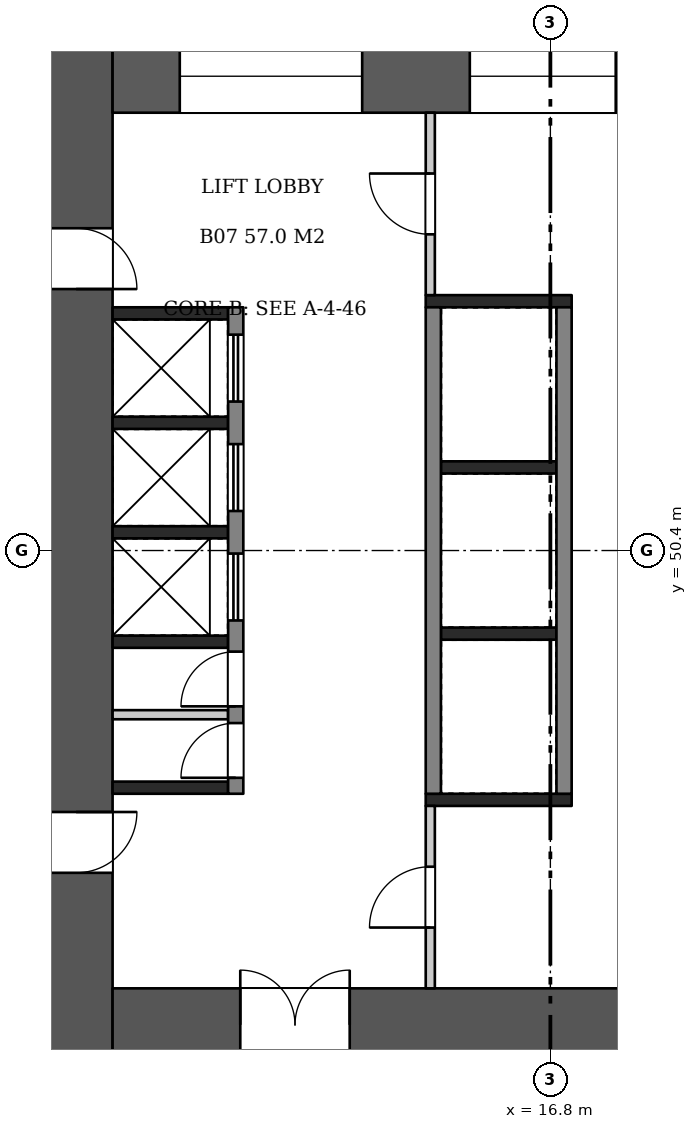
"""IFC4 building model, lengths in metres.
Left out: names, types, materials, properties, quantities, classifications, styles, units other than length and angle.
Written with IfcOpenShell. Run it as: python <this file> out.ifc"""

import sys

from ifc_helpers import new_model, si_unit, direction, frame, frame_2d, origin, place, context, subcontext, project, spatial, rectangle, extrude, element, fill, save


model = new_model("IFC4")
c1 = context("Model", 3, precision=1e-05, world=origin(), true_north=direction((0.0, 1.0)))
c2 = subcontext(c1, "Body", "Model", "MODEL_VIEW")
j1 = project(units=[si_unit("LENGTHUNIT", "METRE"), si_unit("PLANEANGLEUNIT", "RADIAN")], contexts=[c1])
p1 = place(None, origin())
s1 = spatial("IfcSite", under=j1, at=p1, CompositionType="ELEMENT")
p2 = place(p1, origin())
s2 = spatial("IfcBuilding", under=s1, at=p2, CompositionType="ELEMENT")
p3 = place(p2, frame((0.0, 0.0, 35.7)))
s3 = spatial("IfcBuildingStorey", under=s2, at=p3, CompositionType="ELEMENT", Elevation=35.7)
p4 = place(p3, frame((9.0, 58.8, 0.0), z_axis=(0.0, 0.0, 1.0), x_axis=(0.0, -1.0, 0.0)))
e1 = element("IfcWall", 1, at=p4, inside=s3, PredefinedType="SHEAR", context=c2, shape_type="SweptSolid", body=[
    extrude(rectangle(XDim=16.8, YDim=1.2, at=frame_2d((8.4, 0.0))), origin(), (0.0, 0.0, 1.0), 3.22),
])
p5 = place(p4, frame((3.1, 0.0, 0.0)))
e2 = element("IfcOpeningElement", 2, at=p5, cuts=e1, PredefinedType="OPENING", context=c2, shape_type="SweptSolid", body=[
    extrude(rectangle(XDim=1.0, YDim=2.1, at=frame_2d((0.5, 1.05))), frame((0.0, 0.61, 0.0), z_axis=(0.0, -1.0, 0.0), x_axis=(1.0, 0.0, 0.0)), (0.0, 0.0, 1.0), 1.22),
])
p6 = place(p4, frame((12.7, 0.0, 0.0)))
e3 = element("IfcOpeningElement", 3, at=p6, cuts=e1, PredefinedType="OPENING", context=c2, shape_type="SweptSolid", body=[
    extrude(rectangle(XDim=1.0, YDim=2.1, at=frame_2d((0.5, 1.05))), frame((0.0, 0.61, 0.0), z_axis=(0.0, -1.0, 0.0), x_axis=(1.0, 0.0, 0.0)), (0.0, 0.0, 1.0), 1.22),
])
p7 = place(p3, frame((9.6, 58.2, 0.0), z_axis=(0.0, 0.0, 1.0), x_axis=(1.0, 0.0, 0.0)))
e4 = element("IfcWall", 4, at=p7, inside=s3, PredefinedType="SHEAR", context=c2, shape_type="SweptSolid", body=[
    extrude(rectangle(XDim=14.4, YDim=1.2, at=frame_2d((7.2, 0.0))), origin(), (0.0, 0.0, 1.0), 3.22),
])
p8 = place(p7, frame((1.105, 0.0, 0.6)))
e5 = element("IfcOpeningElement", 5, at=p8, cuts=e4, PredefinedType="OPENING", context=c2, shape_type="SweptSolid", body=[
    extrude(rectangle(XDim=3.0, YDim=2.1, at=frame_2d((1.5, 1.05))), frame((0.0, 0.61, 0.0), z_axis=(0.0, -1.0, 0.0), x_axis=(1.0, 0.0, 0.0)), (0.0, 0.0, 1.0), 1.22),
])
p9 = place(p7, frame((5.875, 0.0, 0.6)))
e6 = element("IfcOpeningElement", 6, at=p9, cuts=e4, PredefinedType="OPENING", context=c2, shape_type="SweptSolid", body=[
    extrude(rectangle(XDim=2.4, YDim=2.1, at=frame_2d((1.2, 1.05))), frame((0.0, 0.61, 0.0), z_axis=(0.0, -1.0, 0.0), x_axis=(1.0, 0.0, 0.0)), (0.0, 0.0, 1.0), 1.22),
])
p10 = place(p7, frame((9.993, 0.0, 0.5)))
e7 = element("IfcOpeningElement", 7, at=p10, cuts=e4, PredefinedType="OPENING", context=c2, shape_type="SweptSolid", body=[
    extrude(rectangle(XDim=1.2, YDim=2.4, at=frame_2d((0.6, 1.2))), frame((0.0, 0.61, 0.0), z_axis=(0.0, -1.0, 0.0), x_axis=(1.0, 0.0, 0.0)), (0.0, 0.0, 1.0), 1.22),
])
p11 = place(p7, frame((12.197, 0.0, 0.5)))
e8 = element("IfcOpeningElement", 8, at=p11, cuts=e4, PredefinedType="OPENING", context=c2, shape_type="SweptSolid", body=[
    extrude(rectangle(XDim=1.2, YDim=2.4, at=frame_2d((0.6, 1.2))), frame((0.0, 0.61, 0.0), z_axis=(0.0, -1.0, 0.0), x_axis=(1.0, 0.0, 0.0)), (0.0, 0.0, 1.0), 1.22),
])
p12 = place(p3, frame((9.6, 42.6, 0.0), z_axis=(0.0, 0.0, 1.0), x_axis=(1.0, 0.0, 0.0)))
e9 = element("IfcWall", 9, at=p12, inside=s3, PredefinedType="SHEAR", context=c2, shape_type="SweptSolid", body=[
    extrude(rectangle(XDim=14.4, YDim=1.2, at=frame_2d((7.2, 0.0))), origin(), (0.0, 0.0, 1.0), 3.22),
])
p13 = place(p12, frame((2.1, 0.0, 0.0)))
e10 = element("IfcOpeningElement", 10, at=p13, cuts=e9, PredefinedType="OPENING", context=c2, shape_type="SweptSolid", body=[
    extrude(rectangle(XDim=1.8, YDim=2.1, at=frame_2d((0.9, 1.05))), frame((0.0, 0.61, 0.0), z_axis=(0.0, -1.0, 0.0), x_axis=(1.0, 0.0, 0.0)), (0.0, 0.0, 1.0), 1.22),
])
for number, where, z_axis, x_axis in (
    (11, (9.6, 54.3, 0.0), (0.0, 0.0, 1.0), (1.0, 0.0, 0.0)),
    (12, (9.6, 52.5, 0.0), (0.0, 0.0, 1.0), (1.0, 0.0, 0.0)),
    (13, (9.6, 50.7, 0.0), (0.0, 0.0, 1.0), (1.0, 0.0, 0.0)),
    (14, (9.6, 48.9, 0.0), (0.0, 0.0, 1.0), (1.0, 0.0, 0.0)),
    (15, (9.6, 46.5, 0.0), (0.0, 0.0, 1.0), (1.0, 0.0, 0.0)),
):
    element("IfcWall", number, at=place(p3, frame(where, z_axis=z_axis, x_axis=x_axis)), inside=s3, PredefinedType="SHEAR", context=c2, shape_type="SweptSolid", body=[
        extrude(rectangle(XDim=1.9, YDim=0.2, at=frame_2d((0.95, 0.0))), origin(), (0.0, 0.0, 1.0), 3.22),
    ])
p14 = place(p3, frame((9.6, 47.7, 0.0), z_axis=(0.0, 0.0, 1.0), x_axis=(1.0, 0.0, 0.0)))
e16 = element("IfcWall", 16, at=p14, inside=s3, PredefinedType="PARTITIONING", context=c2, shape_type="SweptSolid", body=[
    extrude(rectangle(XDim=1.9, YDim=0.15, at=frame_2d((0.95, 0.0))), origin(), (0.0, 0.0, 1.0), 3.22),
])
p15 = place(p3, frame((11.625, 54.4, 0.0), z_axis=(0.0, 0.0, 1.0), x_axis=(0.0, -1.0, 0.0)))
e17 = element("IfcWall", 17, at=p15, inside=s3, PredefinedType="SHEAR", context=c2, shape_type="SweptSolid", body=[
    extrude(rectangle(XDim=8.0, YDim=0.25, at=frame_2d((4.0, 0.0))), origin(), (0.0, 0.0, 1.0), 3.22),
])
p16 = place(p15, frame((0.45, 0.0, 0.0)))
e18 = element("IfcOpeningElement", 18, at=p16, cuts=e17, PredefinedType="OPENING", context=c2, shape_type="SweptSolid", body=[
    extrude(rectangle(XDim=1.1, YDim=2.1, at=frame_2d((0.55, 1.05))), frame((0.0, 0.135, 0.0), z_axis=(0.0, -1.0, 0.0), x_axis=(1.0, 0.0, 0.0)), (0.0, 0.0, 1.0), 0.27),
])
p17 = place(p15, frame((2.25, 0.0, 0.0)))
e19 = element("IfcOpeningElement", 19, at=p17, cuts=e17, PredefinedType="OPENING", context=c2, shape_type="SweptSolid", body=[
    extrude(rectangle(XDim=1.1, YDim=2.1, at=frame_2d((0.55, 1.05))), frame((0.0, 0.135, 0.0), z_axis=(0.0, -1.0, 0.0), x_axis=(1.0, 0.0, 0.0)), (0.0, 0.0, 1.0), 0.27),
])
p18 = place(p15, frame((4.05, 0.0, 0.0)))
e20 = element("IfcOpeningElement", 20, at=p18, cuts=e17, PredefinedType="OPENING", context=c2, shape_type="SweptSolid", body=[
    extrude(rectangle(XDim=1.1, YDim=2.1, at=frame_2d((0.55, 1.05))), frame((0.0, 0.135, 0.0), z_axis=(0.0, -1.0, 0.0), x_axis=(1.0, 0.0, 0.0)), (0.0, 0.0, 1.0), 0.27),
])
p19 = place(p15, frame((5.663, 0.0, 0.0)))
e21 = element("IfcOpeningElement", 21, at=p19, cuts=e17, PredefinedType="OPENING", context=c2, shape_type="SweptSolid", body=[
    extrude(rectangle(XDim=0.9, YDim=2.1, at=frame_2d((0.45, 1.05))), frame((0.0, 0.135, 0.0), z_axis=(0.0, -1.0, 0.0), x_axis=(1.0, 0.0, 0.0)), (0.0, 0.0, 1.0), 0.27),
])
p20 = place(p15, frame((6.837, 0.0, 0.0)))
e22 = element("IfcOpeningElement", 22, at=p20, cuts=e17, PredefinedType="OPENING", context=c2, shape_type="SweptSolid", body=[
    extrude(rectangle(XDim=0.9, YDim=2.1, at=frame_2d((0.45, 1.05))), frame((0.0, 0.135, 0.0), z_axis=(0.0, -1.0, 0.0), x_axis=(1.0, 0.0, 0.0)), (0.0, 0.0, 1.0), 0.27),
])
for number, where, z_axis, x_axis in (
    (23, (15.0, 51.767, 0.0), (0.0, 0.0, 1.0), (1.0, 0.0, 0.0)),
    (24, (15.0, 49.033, 0.0), (0.0, 0.0, 1.0), (1.0, 0.0, 0.0)),
):
    element("IfcWall", number, at=place(p3, frame(where, z_axis=z_axis, x_axis=x_axis)), inside=s3, PredefinedType="SHEAR", context=c2, shape_type="SweptSolid", body=[
        extrude(rectangle(XDim=1.9, YDim=0.2, at=frame_2d((0.95, 0.0))), origin(), (0.0, 0.0, 1.0), 3.22),
    ])
for number, where, z_axis, x_axis in (
    (25, (14.875, 54.4, 0.0), (0.0, 0.0, 1.0), (0.0, -1.0, 0.0)),
    (26, (17.025, 54.4, 0.0), (0.0, 0.0, 1.0), (0.0, -1.0, 0.0)),
):
    element("IfcWall", number, at=place(p3, frame(where, z_axis=z_axis, x_axis=x_axis)), inside=s3, PredefinedType="SHEAR", context=c2, shape_type="SweptSolid", body=[
        extrude(rectangle(XDim=8.0, YDim=0.25, at=frame_2d((4.0, 0.0))), origin(), (0.0, 0.0, 1.0), 3.22),
    ])
p21 = place(p3, frame((14.75, 54.5, 0.0), z_axis=(0.0, 0.0, 1.0), x_axis=(1.0, 0.0, 0.0)))
e27 = element("IfcWall", 27, at=p21, inside=s3, PredefinedType="SHEAR", context=c2, shape_type="SweptSolid", body=[
    extrude(rectangle(XDim=2.4, YDim=0.2, at=frame_2d((1.2, 0.0))), origin(), (0.0, 0.0, 1.0), 3.22),
])
p22 = place(p3, frame((14.825, 57.6, 0.0), z_axis=(0.0, 0.0, 1.0), x_axis=(0.0, -1.0, 0.0)))
e28 = element("IfcWall", 28, at=p22, inside=s3, PredefinedType="PARTITIONING", context=c2, shape_type="SweptSolid", body=[
    extrude(rectangle(XDim=3.0, YDim=0.15, at=frame_2d((1.5, 0.0))), origin(), (0.0, 0.0, 1.0), 3.22),
])
p23 = place(p22, frame((1.0, 0.0, 0.0)))
e29 = element("IfcOpeningElement", 29, at=p23, cuts=e28, PredefinedType="OPENING", context=c2, shape_type="SweptSolid", body=[
    extrude(rectangle(XDim=1.0, YDim=2.1, at=frame_2d((0.5, 1.05))), frame((0.0, 0.085, 0.0), z_axis=(0.0, -1.0, 0.0), x_axis=(1.0, 0.0, 0.0)), (0.0, 0.0, 1.0), 0.17),
])
p24 = place(p3, frame((14.75, 46.3, 0.0), z_axis=(0.0, 0.0, 1.0), x_axis=(1.0, 0.0, 0.0)))
e30 = element("IfcWall", 30, at=p24, inside=s3, PredefinedType="SHEAR", context=c2, shape_type="SweptSolid", body=[
    extrude(rectangle(XDim=2.4, YDim=0.2, at=frame_2d((1.2, 0.0))), origin(), (0.0, 0.0, 1.0), 3.22),
])
p25 = place(p3, frame((14.825, 46.2, 0.0), z_axis=(0.0, 0.0, 1.0), x_axis=(0.0, -1.0, 0.0)))
e31 = element("IfcWall", 31, at=p25, inside=s3, PredefinedType="PARTITIONING", context=c2, shape_type="SweptSolid", body=[
    extrude(rectangle(XDim=3.0, YDim=0.15, at=frame_2d((1.5, 0.0))), origin(), (0.0, 0.0, 1.0), 3.22),
])
p26 = place(p25, frame((1.0, 0.0, 0.0)))
e32 = element("IfcOpeningElement", 32, at=p26, cuts=e31, PredefinedType="OPENING", context=c2, shape_type="SweptSolid", body=[
    extrude(rectangle(XDim=1.0, YDim=2.1, at=frame_2d((0.5, 1.05))), frame((0.0, 0.085, 0.0), z_axis=(0.0, -1.0, 0.0), x_axis=(1.0, 0.0, 0.0)), (0.0, 0.0, 1.0), 0.17),
])
p27 = place(p5, origin())
e33 = element("IfcDoor", 33, at=p27, inside=s3, OperationType="SINGLE_SWING_RIGHT", PredefinedType="DOOR", context=c2, shape_type="SweptSolid", body=[
    extrude(rectangle(XDim=1.0, YDim=2.1, at=frame_2d((0.5, 1.05))), frame((0.0, 0.025, 0.0), z_axis=(0.0, -1.0, 0.0), x_axis=(1.0, 0.0, 0.0)), (0.0, 0.0, 1.0), 0.05),
])
fill(e2, e33)
p28 = place(p6, origin())
e34 = element("IfcDoor", 34, at=p28, inside=s3, OperationType="SINGLE_SWING_LEFT", PredefinedType="DOOR", context=c2, shape_type="SweptSolid", body=[
    extrude(rectangle(XDim=1.0, YDim=2.1, at=frame_2d((0.5, 1.05))), frame((0.0, 0.025, 0.0), z_axis=(0.0, -1.0, 0.0), x_axis=(1.0, 0.0, 0.0)), (0.0, 0.0, 1.0), 0.05),
])
fill(e3, e34)
p29 = place(p13, origin())
e35 = element("IfcDoor", 35, at=p29, inside=s3, OperationType="DOUBLE_DOOR_SINGLE_SWING", PredefinedType="DOOR", context=c2, shape_type="SweptSolid", body=[
    extrude(rectangle(XDim=1.8, YDim=2.1, at=frame_2d((0.9, 1.05))), frame((0.0, 0.025, 0.0), z_axis=(0.0, -1.0, 0.0), x_axis=(1.0, 0.0, 0.0)), (0.0, 0.0, 1.0), 0.05),
])
fill(e10, e35)
p30 = place(p16, origin())
e36 = element("IfcDoor", 36, at=p30, inside=s3, OperationType="DOUBLE_DOOR_SLIDING", PredefinedType="DOOR", context=c2, shape_type="SweptSolid", body=[
    extrude(rectangle(XDim=1.1, YDim=2.1, at=frame_2d((0.55, 1.05))), frame((0.0, 0.025, 0.0), z_axis=(0.0, -1.0, 0.0), x_axis=(1.0, 0.0, 0.0)), (0.0, 0.0, 1.0), 0.05),
])
fill(e18, e36)
p31 = place(p17, origin())
e37 = element("IfcDoor", 37, at=p31, inside=s3, OperationType="DOUBLE_DOOR_SLIDING", PredefinedType="DOOR", context=c2, shape_type="SweptSolid", body=[
    extrude(rectangle(XDim=1.1, YDim=2.1, at=frame_2d((0.55, 1.05))), frame((0.0, 0.025, 0.0), z_axis=(0.0, -1.0, 0.0), x_axis=(1.0, 0.0, 0.0)), (0.0, 0.0, 1.0), 0.05),
])
fill(e19, e37)
p32 = place(p18, origin())
e38 = element("IfcDoor", 38, at=p32, inside=s3, OperationType="DOUBLE_DOOR_SLIDING", PredefinedType="DOOR", context=c2, shape_type="SweptSolid", body=[
    extrude(rectangle(XDim=1.1, YDim=2.1, at=frame_2d((0.55, 1.05))), frame((0.0, 0.025, 0.0), z_axis=(0.0, -1.0, 0.0), x_axis=(1.0, 0.0, 0.0)), (0.0, 0.0, 1.0), 0.05),
])
fill(e20, e38)
p33 = place(p19, frame((0.9, 0.0, 0.0), z_axis=(0.0, 0.0, 1.0), x_axis=(-1.0, 0.0, 0.0)))
e39 = element("IfcDoor", 39, at=p33, inside=s3, OperationType="SINGLE_SWING_LEFT", PredefinedType="DOOR", context=c2, shape_type="SweptSolid", body=[
    extrude(rectangle(XDim=0.9, YDim=2.1, at=frame_2d((0.45, 1.05))), frame((0.0, 0.025, 0.0), z_axis=(0.0, -1.0, 0.0), x_axis=(1.0, 0.0, 0.0)), (0.0, 0.0, 1.0), 0.05),
])
fill(e21, e39)
p34 = place(p20, frame((0.9, 0.0, 0.0), z_axis=(0.0, 0.0, 1.0), x_axis=(-1.0, 0.0, 0.0)))
e40 = element("IfcDoor", 40, at=p34, inside=s3, OperationType="SINGLE_SWING_LEFT", PredefinedType="DOOR", context=c2, shape_type="SweptSolid", body=[
    extrude(rectangle(XDim=0.9, YDim=2.1, at=frame_2d((0.45, 1.05))), frame((0.0, 0.025, 0.0), z_axis=(0.0, -1.0, 0.0), x_axis=(1.0, 0.0, 0.0)), (0.0, 0.0, 1.0), 0.05),
])
fill(e22, e40)
p35 = place(p23, frame((1.0, 0.0, 0.0), z_axis=(0.0, 0.0, 1.0), x_axis=(-1.0, 0.0, 0.0)))
e41 = element("IfcDoor", 41, at=p35, inside=s3, OperationType="SINGLE_SWING_RIGHT", PredefinedType="DOOR", context=c2, shape_type="SweptSolid", body=[
    extrude(rectangle(XDim=1.0, YDim=2.1, at=frame_2d((0.5, 1.05))), frame((0.0, 0.025, 0.0), z_axis=(0.0, -1.0, 0.0), x_axis=(1.0, 0.0, 0.0)), (0.0, 0.0, 1.0), 0.05),
])
fill(e29, e41)
p36 = place(p26, frame((1.0, 0.0, 0.0), z_axis=(0.0, 0.0, 1.0), x_axis=(-1.0, 0.0, 0.0)))
e42 = element("IfcDoor", 42, at=p36, inside=s3, OperationType="SINGLE_SWING_LEFT", PredefinedType="DOOR", context=c2, shape_type="SweptSolid", body=[
    extrude(rectangle(XDim=1.0, YDim=2.1, at=frame_2d((0.5, 1.05))), frame((0.0, 0.025, 0.0), z_axis=(0.0, -1.0, 0.0), x_axis=(1.0, 0.0, 0.0)), (0.0, 0.0, 1.0), 0.05),
])
fill(e32, e42)
p37 = place(p8, origin())
e43 = element("IfcWindow", 43, at=p37, inside=s3, PartitioningType="SINGLE_PANEL", PredefinedType="WINDOW", context=c2, shape_type="SweptSolid", body=[
    extrude(rectangle(XDim=3.0, YDim=2.1, at=frame_2d((1.5, 1.05))), frame((0.0, 0.03, 0.0), z_axis=(0.0, -1.0, 0.0), x_axis=(1.0, 0.0, 0.0)), (0.0, 0.0, 1.0), 0.06),
])
fill(e5, e43)
p38 = place(p9, origin())
e44 = element("IfcWindow", 44, at=p38, inside=s3, PartitioningType="SINGLE_PANEL", PredefinedType="WINDOW", context=c2, shape_type="SweptSolid", body=[
    extrude(rectangle(XDim=2.4, YDim=2.1, at=frame_2d((1.2, 1.05))), frame((0.0, 0.03, 0.0), z_axis=(0.0, -1.0, 0.0), x_axis=(1.0, 0.0, 0.0)), (0.0, 0.0, 1.0), 0.06),
])
fill(e6, e44)
save(model, sys.argv[1])
